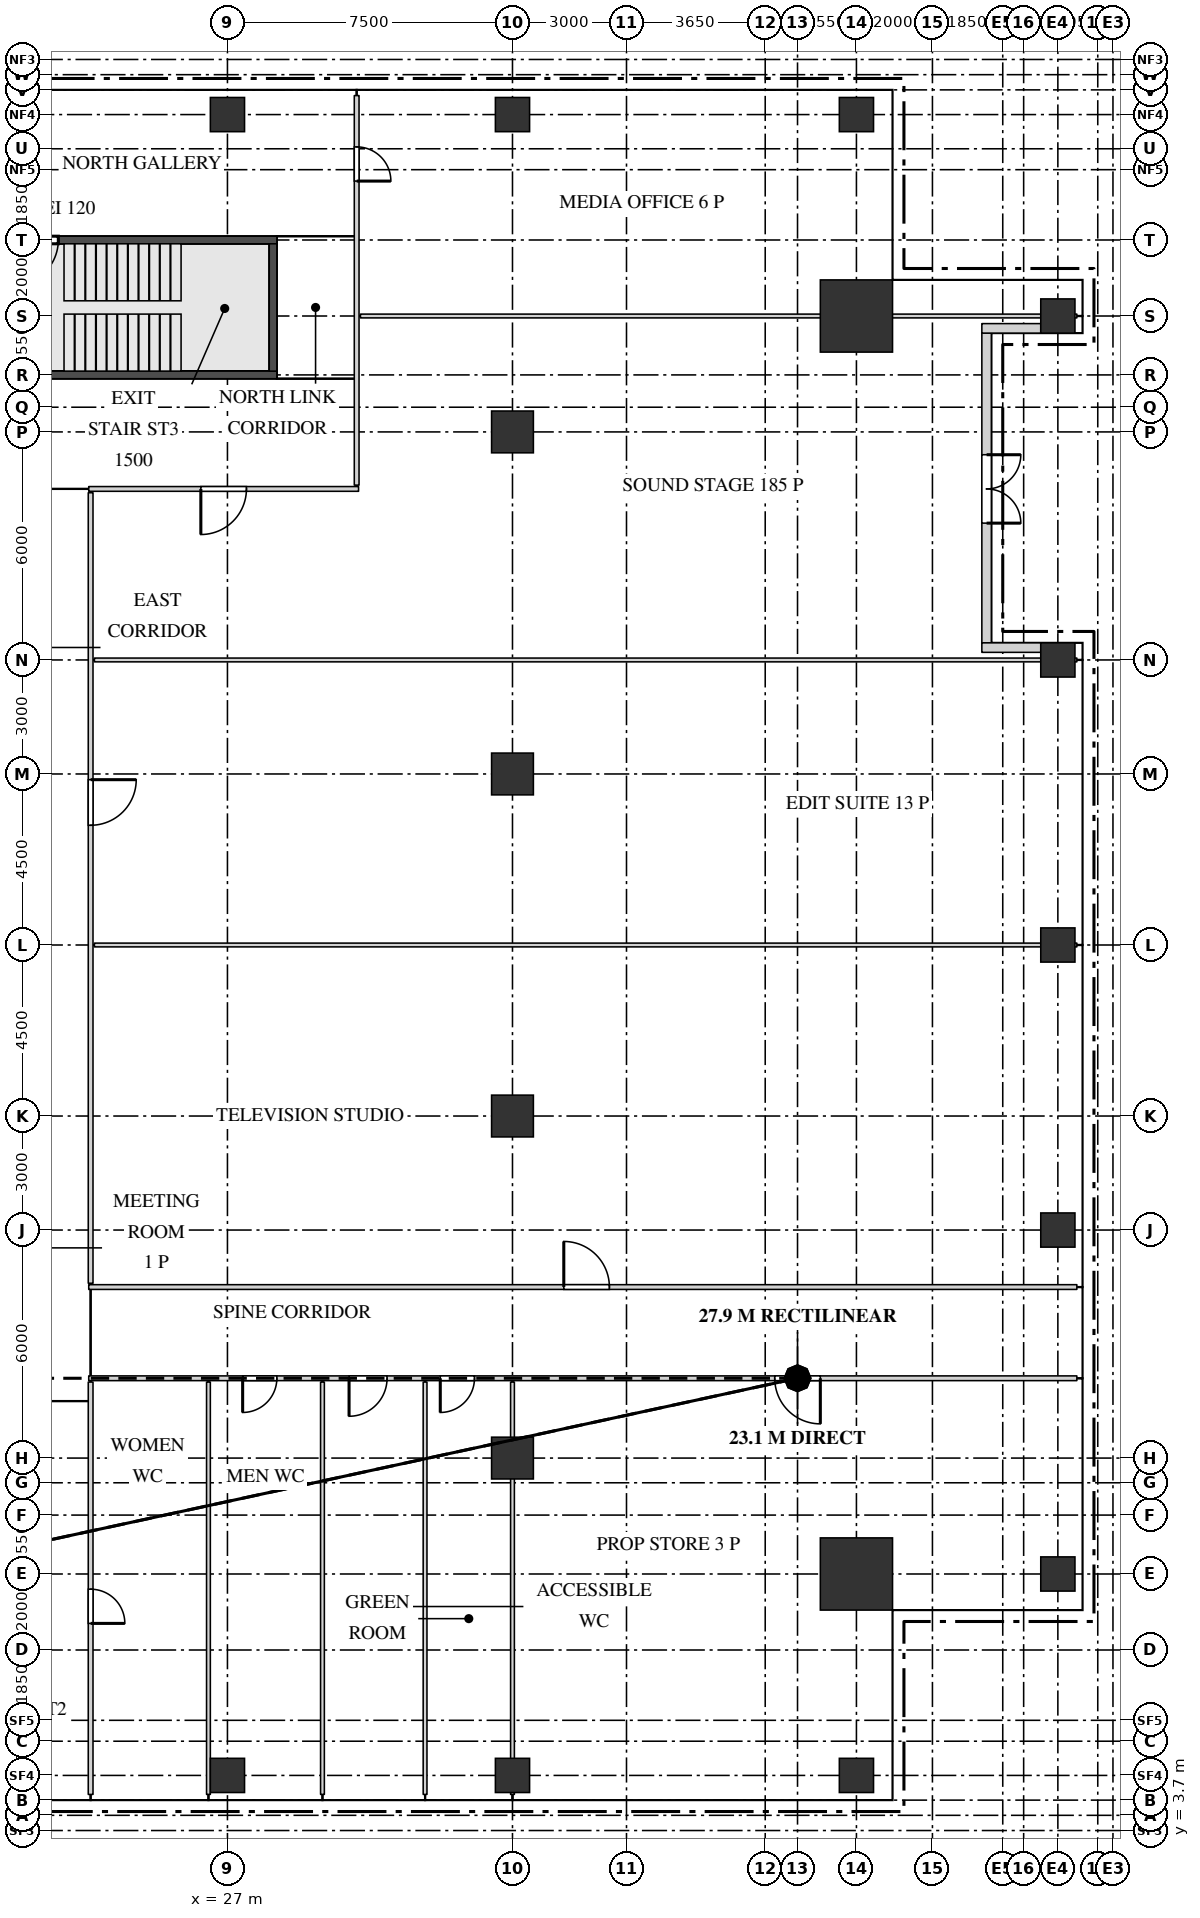
"""IFC4 building model, lengths in metres.
Left out: names, types, materials, properties, quantities, classifications, styles, units other than length and angle.
Written with IfcOpenShell. Run it as: python <this file> out.ifc"""

import sys

from ifc_helpers import new_model, si_unit, direction, frame, frame_2d, origin, origin_2d, place, context, subcontext, project, spatial, rectangle, extrude, source, transform, mapped, element, fill, save


model = new_model("IFC4")
c1 = context("Model", 3, precision=1e-05, world=origin(), true_north=direction((0.0, 1.0)))
c2 = subcontext(c1, "Body", "Model", "MODEL_VIEW")
j1 = project(units=[si_unit("LENGTHUNIT", "METRE"), si_unit("PLANEANGLEUNIT", "RADIAN")], contexts=[c1])
p1 = place(None, origin())
s1 = spatial("IfcSite", under=j1, at=p1, CompositionType="ELEMENT")
p2 = place(p1, origin())
s2 = spatial("IfcBuilding", under=s1, at=p2, CompositionType="ELEMENT")
p3 = place(p2, frame((0.0, 0.0, 246.2)))
s3 = spatial("IfcBuildingStorey", under=s2, at=p3, CompositionType="ELEMENT", Elevation=246.2)
m1 = source(origin(), c2, "Body", "SweptSolid", [
    extrude(rectangle(XDim=7.1, YDim=0.2, at=frame_2d((3.55, 0.0))), origin(), (0.0, 0.0, 1.0), 3.75),
])
p4 = place(p3, frame((21.2, 45.55, 0.0), z_axis=(0.0, 0.0, 1.0), x_axis=(1.0, 0.0, 0.0)))
e1 = element("IfcWall", 1, at=p4, inside=s3, PredefinedType="SHEAR", context=c2, shape_type="MappedRepresentation", body=[
    mapped(m1, transform((0.0, 0.0, 0.0))),
])
m2 = source(origin(), c2, "Body", "SweptSolid", [
    extrude(rectangle(XDim=1.2, YDim=2.1, at=frame_2d((0.6, 1.05))), frame((0.0, 0.11, 0.0), z_axis=(0.0, -1.0, 0.0), x_axis=(1.0, 0.0, 0.0)), (0.0, 0.0, 1.0), 0.22),
])
p5 = place(p4, frame((0.15, 0.0, 0.0)))
e2 = element("IfcOpeningElement", 2, at=p5, cuts=e1, PredefinedType="OPENING", context=c2, shape_type="MappedRepresentation", body=[
    mapped(m2, transform((0.0, 0.0, 0.0))),
])
p6 = place(p3, frame((21.2, 42.0, 0.0), z_axis=(0.0, 0.0, 1.0), x_axis=(1.0, 0.0, 0.0)))
e3 = element("IfcWall", 3, at=p6, inside=s3, PredefinedType="SHEAR", context=c2, shape_type="MappedRepresentation", body=[
    mapped(m1, transform((0.0, 0.0, 0.0))),
])
m3 = source(origin(), c2, "Body", "SweptSolid", [
    extrude(rectangle(XDim=3.35, YDim=0.2, at=frame_2d((1.675, 0.0))), origin(), (0.0, 0.0, 1.0), 3.75),
])
p7 = place(p3, frame((28.2, 42.1, 0.0), z_axis=(0.0, 0.0, 1.0), x_axis=(0.0, 1.0, 0.0)))
e4 = element("IfcWall", 4, at=p7, inside=s3, PredefinedType="SHEAR", context=c2, shape_type="MappedRepresentation", body=[
    mapped(m3, transform((0.0, 0.0, 0.0))),
])
m4 = source(origin(), c2, "Body", "SweptSolid", [
    extrude(rectangle(XDim=1.9, YDim=1.9, at=origin_2d()), origin(), (0.0, 0.0, 1.0), 4.0),
])
for number, where, z_axis, x_axis in (
    (5, (43.55, 43.55, 0.0), (0.0, 0.0, 1.0), (1.0, 0.0, 0.0)),
    (6, (43.55, 10.45, 0.0), (0.0, 0.0, 1.0), (1.0, 0.0, 0.0)),
):
    element("IfcColumn", number, at=place(p3, frame(where, z_axis=z_axis, x_axis=x_axis)), inside=s3, PredefinedType="COLUMN", context=c2, shape_type="MappedRepresentation", body=[
        mapped(m4, transform((0.0, 0.0, 0.0))),
    ])
m5 = source(origin(), c2, "Body", "SweptSolid", [
    extrude(rectangle(XDim=0.9, YDim=0.9, at=origin_2d()), origin(), (0.0, 0.0, 1.0), 3.75),
])
for number, where, z_axis, x_axis in (
    (7, (27.0, 5.15, 0.0), (0.0, 0.0, 1.0), (1.0, 0.0, 0.0)),
    (8, (34.5, 5.15, 0.0), (0.0, 0.0, 1.0), (1.0, 0.0, 0.0)),
    (9, (43.55, 5.15, 0.0), (0.0, 0.0, 1.0), (1.0, 0.0, 0.0)),
    (10, (48.85, 10.45, 0.0), (0.0, 0.0, 1.0), (1.0, 0.0, 0.0)),
    (11, (48.85, 19.5, 0.0), (0.0, 0.0, 1.0), (1.0, 0.0, 0.0)),
    (12, (48.85, 27.0, 0.0), (0.0, 0.0, 1.0), (1.0, 0.0, 0.0)),
    (13, (48.85, 34.5, 0.0), (0.0, 0.0, 1.0), (1.0, 0.0, 0.0)),
    (14, (48.85, 43.55, 0.0), (0.0, 0.0, 1.0), (1.0, 0.0, 0.0)),
    (15, (27.0, 48.85, 0.0), (0.0, 0.0, 1.0), (1.0, 0.0, 0.0)),
    (16, (34.5, 48.85, 0.0), (0.0, 0.0, 1.0), (1.0, 0.0, 0.0)),
    (17, (43.55, 48.85, 0.0), (0.0, 0.0, 1.0), (1.0, 0.0, 0.0)),
):
    element("IfcColumn", number, at=place(p3, frame(where, z_axis=z_axis, x_axis=x_axis)), inside=s3, PredefinedType="COLUMN", context=c2, shape_type="MappedRepresentation", body=[
        mapped(m5, transform((0.0, 0.0, 0.0))),
    ])
m6 = source(origin(), c2, "Body", "SweptSolid", [
    extrude(rectangle(XDim=1.1, YDim=1.1, at=origin_2d()), origin(), (0.0, 0.0, 1.0), 3.75),
])
for number, where, z_axis, x_axis in (
    (18, (34.5, 13.5, 0.0), (0.0, 0.0, 1.0), (1.0, 0.0, 0.0)),
    (19, (34.5, 22.5, 0.0), (0.0, 0.0, 1.0), (1.0, 0.0, 0.0)),
    (20, (34.5, 31.5, 0.0), (0.0, 0.0, 1.0), (1.0, 0.0, 0.0)),
    (21, (34.5, 40.5, 0.0), (0.0, 0.0, 1.0), (1.0, 0.0, 0.0)),
):
    element("IfcColumn", number, at=place(p3, frame(where, z_axis=z_axis, x_axis=x_axis)), inside=s3, PredefinedType="COLUMN", context=c2, shape_type="MappedRepresentation", body=[
        mapped(m6, transform((0.0, 0.0, 0.0))),
    ])
m7 = source(origin(), c2, "Body", "SweptSolid", [
    extrude(rectangle(XDim=8.15, YDim=0.25, at=frame_2d((4.075, 0.0))), origin(), (0.0, 0.0, 1.0), 3.2),
])
p8 = place(p3, frame((46.975, 34.95, 0.0), z_axis=(0.0, 0.0, 1.0), x_axis=(0.0, 1.0, 0.0)))
e22 = element("IfcWall", 22, at=p8, inside=s3, PredefinedType="SOLIDWALL", context=c2, shape_type="MappedRepresentation", body=[
    mapped(m7, transform((0.0, 0.0, 0.0))),
])
m8 = source(origin(), c2, "Body", "SweptSolid", [
    extrude(rectangle(XDim=2.5, YDim=2.4, at=frame_2d((1.25, 1.2))), frame((0.0, 0.135, 0.0), z_axis=(0.0, -1.0, 0.0), x_axis=(1.0, 0.0, 0.0)), (0.0, 0.0, 1.0), 0.27),
])
p9 = place(p8, frame((0.35, 0.0, 0.0)))
e23 = element("IfcOpeningElement", 23, at=p9, cuts=e22, PredefinedType="OPENING", context=c2, shape_type="MappedRepresentation", body=[
    mapped(m8, transform((0.0, 0.0, 0.0))),
])
p10 = place(p8, frame((5.25, 0.0, 0.0)))
e24 = element("IfcOpeningElement", 24, at=p10, cuts=e22, PredefinedType="OPENING", context=c2, shape_type="MappedRepresentation", body=[
    mapped(m8, transform((0.0, 0.0, 0.0))),
])
m9 = source(origin(), c2, "Body", "SweptSolid", [
    extrude(rectangle(XDim=1.8, YDim=2.4, at=frame_2d((0.9, 1.2))), frame((0.0, 0.135, 0.0), z_axis=(0.0, -1.0, 0.0), x_axis=(1.0, 0.0, 0.0)), (0.0, 0.0, 1.0), 0.27),
])
p11 = place(p8, frame((3.15, 0.0, 0.0)))
e25 = element("IfcOpeningElement", 25, at=p11, cuts=e22, PredefinedType="OPENING", context=c2, shape_type="MappedRepresentation", body=[
    mapped(m9, transform((0.0, 0.0, 0.0))),
])
m10 = source(origin(), c2, "Body", "SweptSolid", [
    extrude(rectangle(XDim=1.55, YDim=0.25, at=frame_2d((0.775, 0.0))), origin(), (0.0, 0.0, 1.0), 3.2),
])
for number, where, z_axis, x_axis in (
    (26, (48.4, 34.825, 0.0), (0.0, 0.0, 1.0), (-1.0, 0.0, 0.0)),
    (27, (48.4, 43.225, 0.0), (0.0, 0.0, 1.0), (-1.0, 0.0, 0.0)),
):
    element("IfcWall", number, at=place(p3, frame(where, z_axis=z_axis, x_axis=x_axis)), inside=s3, PredefinedType="SOLIDWALL", context=c2, shape_type="MappedRepresentation", body=[
        mapped(m10, transform((0.0, 0.0, 0.0))),
    ])
m11 = source(origin(), c2, "Body", "SweptSolid", [
    extrude(rectangle(XDim=10.85, YDim=0.125, at=frame_2d((5.425, 0.0))), origin(), (0.0, 0.0, 1.0), 3.8),
])
p12 = place(p3, frame((23.4, 4.65, 0.0), z_axis=(0.0, 0.0, 1.0), x_axis=(0.0, 1.0, 0.0)))
e28 = element("IfcWall", 28, at=p12, inside=s3, PredefinedType="PARTITIONING", context=c2, shape_type="MappedRepresentation", body=[
    mapped(m11, transform((0.0, 0.0, 0.0))),
])
m12 = source(origin(), c2, "Body", "SweptSolid", [
    extrude(rectangle(XDim=0.9, YDim=2.1, at=frame_2d((0.45, 1.05))), frame((0.0, 0.073, 0.0), z_axis=(0.0, -1.0, 0.0), x_axis=(1.0, 0.0, 0.0)), (0.0, 0.0, 1.0), 0.145),
])
p13 = place(p12, frame((4.5, 0.0, 0.0)))
e29 = element("IfcOpeningElement", 29, at=p13, cuts=e28, PredefinedType="OPENING", context=c2, shape_type="MappedRepresentation", body=[
    mapped(m12, transform((0.0, 0.0, 0.0))),
])
m13 = source(origin(), c2, "Body", "SweptSolid", [
    extrude(rectangle(XDim=10.85, YDim=0.1, at=frame_2d((5.425, 0.0))), origin(), (0.0, 0.0, 1.0), 3.8),
])
for number, where, z_axis, x_axis in (
    (30, (26.5, 4.65, 0.0), (0.0, 0.0, 1.0), (0.0, 1.0, 0.0)),
    (31, (29.5, 4.65, 0.0), (0.0, 0.0, 1.0), (0.0, 1.0, 0.0)),
    (32, (32.2, 4.65, 0.0), (0.0, 0.0, 1.0), (0.0, 1.0, 0.0)),
):
    element("IfcWall", number, at=place(p3, frame(where, z_axis=z_axis, x_axis=x_axis)), inside=s3, PredefinedType="PARTITIONING", context=c2, shape_type="MappedRepresentation", body=[
        mapped(m13, transform((0.0, 0.0, 0.0))),
    ])
m14 = source(origin(), c2, "Body", "SweptSolid", [
    extrude(rectangle(XDim=10.85, YDim=0.1, at=frame_2d((5.425, 0.0))), origin(), (0.0, 0.0, 1.0), 3.35),
])
p14 = place(p3, frame((34.5, 4.65, 0.0), z_axis=(0.0, 0.0, 1.0), x_axis=(0.0, 1.0, 0.0)))
e33 = element("IfcWall", 33, at=p14, inside=s3, PredefinedType="PARTITIONING", context=c2, shape_type="MappedRepresentation", body=[
    mapped(m14, transform((0.0, 0.0, 0.0))),
])
m15 = source(origin(), c2, "Body", "SweptSolid", [
    extrude(rectangle(XDim=26.0, YDim=0.125, at=frame_2d((13.0, 0.0))), origin(), (0.0, 0.0, 1.0), 3.8),
])
p15 = place(p3, frame((23.35, 15.6, 0.0), z_axis=(0.0, 0.0, 1.0), x_axis=(1.0, 0.0, 0.0)))
e34 = element("IfcWall", 34, at=p15, inside=s3, PredefinedType="PARTITIONING", context=c2, shape_type="MappedRepresentation", body=[
    mapped(m15, transform((0.0, 0.0, 0.0))),
])
p16 = place(p15, frame((4.05, 0.0, 0.0)))
e35 = element("IfcOpeningElement", 35, at=p16, cuts=e34, PredefinedType="OPENING", context=c2, shape_type="MappedRepresentation", body=[
    mapped(m12, transform((0.0, 0.0, 0.0))),
])
m16 = source(origin(), c2, "Body", "SweptSolid", [
    extrude(rectangle(XDim=1.0, YDim=2.1, at=frame_2d((0.5, 1.05))), frame((0.0, 0.073, 0.0), z_axis=(0.0, -1.0, 0.0), x_axis=(1.0, 0.0, 0.0)), (0.0, 0.0, 1.0), 0.145),
])
p17 = place(p15, frame((6.85, 0.0, 0.0)))
e36 = element("IfcOpeningElement", 36, at=p17, cuts=e34, PredefinedType="OPENING", context=c2, shape_type="MappedRepresentation", body=[
    mapped(m16, transform((0.0, 0.0, 0.0))),
])
p18 = place(p15, frame((9.25, 0.0, 0.0)))
e37 = element("IfcOpeningElement", 37, at=p18, cuts=e34, PredefinedType="OPENING", context=c2, shape_type="MappedRepresentation", body=[
    mapped(m12, transform((0.0, 0.0, 0.0))),
])
m17 = source(origin(), c2, "Body", "SweptSolid", [
    extrude(rectangle(XDim=1.2, YDim=2.1, at=frame_2d((0.6, 1.05))), frame((0.0, 0.073, 0.0), z_axis=(0.0, -1.0, 0.0), x_axis=(1.0, 0.0, 0.0)), (0.0, 0.0, 1.0), 0.145),
])
p19 = place(p15, frame((18.05, 0.0, 0.0)))
e38 = element("IfcOpeningElement", 38, at=p19, cuts=e34, PredefinedType="OPENING", context=c2, shape_type="MappedRepresentation", body=[
    mapped(m17, transform((0.0, 0.0, 0.0))),
])
p20 = place(p3, frame((23.35, 18.0, 0.0), z_axis=(0.0, 0.0, 1.0), x_axis=(1.0, 0.0, 0.0)))
e39 = element("IfcWall", 39, at=p20, inside=s3, PredefinedType="PARTITIONING", context=c2, shape_type="MappedRepresentation", body=[
    mapped(m15, transform((0.0, 0.0, 0.0))),
])
p21 = place(p20, frame((12.5, 0.0, 0.0)))
e40 = element("IfcOpeningElement", 40, at=p21, cuts=e39, PredefinedType="OPENING", context=c2, shape_type="MappedRepresentation", body=[
    mapped(m17, transform((0.0, 0.0, 0.0))),
])
m18 = source(origin(), c2, "Body", "SweptSolid", [
    extrude(rectangle(XDim=20.8, YDim=0.125, at=frame_2d((10.4, 0.0))), origin(), (0.0, 0.0, 1.0), 3.8),
])
p22 = place(p3, frame((23.4, 18.1, 0.0), z_axis=(0.0, 0.0, 1.0), x_axis=(0.0, 1.0, 0.0)))
e41 = element("IfcWall", 41, at=p22, inside=s3, PredefinedType="PARTITIONING", context=c2, shape_type="MappedRepresentation", body=[
    mapped(m18, transform((0.0, 0.0, 0.0))),
])
p23 = place(p22, frame((12.05, 0.0, 0.0)))
e42 = element("IfcOpeningElement", 42, at=p23, cuts=e41, PredefinedType="OPENING", context=c2, shape_type="MappedRepresentation", body=[
    mapped(m17, transform((0.0, 0.0, 0.0))),
])
m19 = source(origin(), c2, "Body", "SweptSolid", [
    extrude(rectangle(XDim=25.85, YDim=0.1, at=frame_2d((12.925, 0.0))), origin(), (0.0, 0.0, 1.0), 3.8),
])
for number, where, z_axis, x_axis in (
    (43, (23.5, 27.0, 0.0), (0.0, 0.0, 1.0), (1.0, 0.0, 0.0)),
    (44, (23.5, 34.5, 0.0), (0.0, 0.0, 1.0), (1.0, 0.0, 0.0)),
):
    element("IfcWall", number, at=place(p3, frame(where, z_axis=z_axis, x_axis=x_axis)), inside=s3, PredefinedType="PARTITIONING", context=c2, shape_type="MappedRepresentation", body=[
        mapped(m19, transform((0.0, 0.0, 0.0))),
    ])
m20 = source(origin(), c2, "Body", "SweptSolid", [
    extrude(rectangle(XDim=7.1, YDim=0.125, at=frame_2d((3.55, 0.0))), origin(), (0.0, 0.0, 1.0), 3.8),
])
p24 = place(p3, frame((23.35, 39.0, 0.0), z_axis=(0.0, 0.0, 1.0), x_axis=(1.0, 0.0, 0.0)))
e45 = element("IfcWall", 45, at=p24, inside=s3, PredefinedType="PARTITIONING", context=c2, shape_type="MappedRepresentation", body=[
    mapped(m20, transform((0.0, 0.0, 0.0))),
])
p25 = place(p24, frame((2.95, 0.0, 0.0)))
e46 = element("IfcOpeningElement", 46, at=p25, cuts=e45, PredefinedType="OPENING", context=c2, shape_type="MappedRepresentation", body=[
    mapped(m17, transform((0.0, 0.0, 0.0))),
])
m21 = source(origin(), c2, "Body", "SweptSolid", [
    extrude(rectangle(XDim=10.25, YDim=0.125, at=frame_2d((5.125, 0.0))), origin(), (0.0, 0.0, 1.0), 3.8),
])
p26 = place(p3, frame((30.4, 39.1, 0.0), z_axis=(0.0, 0.0, 1.0), x_axis=(0.0, 1.0, 0.0)))
e47 = element("IfcWall", 47, at=p26, inside=s3, PredefinedType="PARTITIONING", context=c2, shape_type="MappedRepresentation", body=[
    mapped(m21, transform((0.0, 0.0, 0.0))),
])
p27 = place(p26, frame((8.0, 0.0, 0.0)))
e48 = element("IfcOpeningElement", 48, at=p27, cuts=e47, PredefinedType="OPENING", context=c2, shape_type="MappedRepresentation", body=[
    mapped(m12, transform((0.0, 0.0, 0.0))),
])
m22 = source(origin(), c2, "Body", "SweptSolid", [
    extrude(rectangle(XDim=18.85, YDim=0.1, at=frame_2d((9.425, 0.0))), origin(), (0.0, 0.0, 1.0), 3.3),
])
p28 = place(p3, frame((30.5, 43.55, 0.0), z_axis=(0.0, 0.0, 1.0), x_axis=(1.0, 0.0, 0.0)))
e49 = element("IfcWall", 49, at=p28, inside=s3, PredefinedType="PARTITIONING", context=c2, shape_type="MappedRepresentation", body=[
    mapped(m22, transform((0.0, 0.0, 0.0))),
])
m23 = source(origin(), c2, "Body", "SweptSolid", [
    extrude(rectangle(XDim=2.5, YDim=2.4, at=frame_2d((1.25, 1.2))), frame((0.0, 0.03, 0.0), z_axis=(0.0, -1.0, 0.0), x_axis=(1.0, 0.0, 0.0)), (0.0, 0.0, 1.0), 0.06),
])
p29 = place(p9, origin())
e50 = element("IfcWindow", 50, at=p29, inside=s3, PartitioningType="SINGLE_PANEL", PredefinedType="WINDOW", context=c2, shape_type="MappedRepresentation", body=[
    mapped(m23, transform((0.0, 0.0, 0.0))),
])
fill(e23, e50)
p30 = place(p10, origin())
e51 = element("IfcWindow", 51, at=p30, inside=s3, PartitioningType="SINGLE_PANEL", PredefinedType="WINDOW", context=c2, shape_type="MappedRepresentation", body=[
    mapped(m23, transform((0.0, 0.0, 0.0))),
])
fill(e24, e51)
m24 = source(origin(), c2, "Body", "SweptSolid", [
    extrude(rectangle(XDim=1.8, YDim=2.4, at=frame_2d((0.9, 1.2))), frame((0.0, 0.025, 0.0), z_axis=(0.0, -1.0, 0.0), x_axis=(1.0, 0.0, 0.0)), (0.0, 0.0, 1.0), 0.05),
])
p31 = place(p11, origin())
e52 = element("IfcDoor", 52, at=p31, inside=s3, OperationType="DOUBLE_DOOR_DOUBLE_SWING", PredefinedType="DOOR", context=c2, shape_type="MappedRepresentation", body=[
    mapped(m24, transform((0.0, 0.0, 0.0))),
])
fill(e25, e52)
m25 = source(origin(), c2, "Body", "SweptSolid", [
    extrude(rectangle(XDim=0.9, YDim=2.1, at=frame_2d((0.45, 1.05))), frame((0.0, 0.025, 0.0), z_axis=(0.0, -1.0, 0.0), x_axis=(1.0, 0.0, 0.0)), (0.0, 0.0, 1.0), 0.05),
])
p32 = place(p13, origin())
e53 = element("IfcDoor", 53, at=p32, inside=s3, OperationType="SINGLE_SWING_LEFT", PredefinedType="DOOR", context=c2, shape_type="MappedRepresentation", body=[
    mapped(m25, transform((0.0, 0.0, 0.0))),
])
fill(e29, e53)
p33 = place(p16, origin())
e54 = element("IfcDoor", 54, at=p33, inside=s3, OperationType="SINGLE_SWING_LEFT", PredefinedType="DOOR", context=c2, shape_type="MappedRepresentation", body=[
    mapped(m25, transform((0.0, 0.0, 0.0))),
])
fill(e35, e54)
m26 = source(origin(), c2, "Body", "SweptSolid", [
    extrude(rectangle(XDim=1.0, YDim=2.1, at=frame_2d((0.5, 1.05))), frame((0.0, 0.025, 0.0), z_axis=(0.0, -1.0, 0.0), x_axis=(1.0, 0.0, 0.0)), (0.0, 0.0, 1.0), 0.05),
])
p34 = place(p17, origin())
e55 = element("IfcDoor", 55, at=p34, inside=s3, OperationType="SINGLE_SWING_LEFT", PredefinedType="DOOR", context=c2, shape_type="MappedRepresentation", body=[
    mapped(m26, transform((0.0, 0.0, 0.0))),
])
fill(e36, e55)
p35 = place(p18, origin())
e56 = element("IfcDoor", 56, at=p35, inside=s3, OperationType="SINGLE_SWING_LEFT", PredefinedType="DOOR", context=c2, shape_type="MappedRepresentation", body=[
    mapped(m25, transform((0.0, 0.0, 0.0))),
])
fill(e37, e56)
m27 = source(origin(), c2, "Body", "SweptSolid", [
    extrude(rectangle(XDim=1.2, YDim=2.1, at=frame_2d((0.6, 1.05))), frame((0.0, 0.025, 0.0), z_axis=(0.0, -1.0, 0.0), x_axis=(1.0, 0.0, 0.0)), (0.0, 0.0, 1.0), 0.05),
])
p36 = place(p19, origin())
e57 = element("IfcDoor", 57, at=p36, inside=s3, OperationType="SINGLE_SWING_RIGHT", PredefinedType="DOOR", context=c2, shape_type="MappedRepresentation", body=[
    mapped(m27, transform((0.0, 0.0, 0.0))),
])
fill(e38, e57)
p37 = place(p21, origin())
e58 = element("IfcDoor", 58, at=p37, inside=s3, OperationType="SINGLE_SWING_RIGHT", PredefinedType="DOOR", context=c2, shape_type="MappedRepresentation", body=[
    mapped(m27, transform((0.0, 0.0, 0.0))),
])
fill(e40, e58)
p38 = place(p23, origin())
e59 = element("IfcDoor", 59, at=p38, inside=s3, OperationType="SINGLE_SWING_RIGHT", PredefinedType="DOOR", context=c2, shape_type="MappedRepresentation", body=[
    mapped(m27, transform((0.0, 0.0, 0.0))),
])
fill(e42, e59)
p39 = place(p25, origin())
e60 = element("IfcDoor", 60, at=p39, inside=s3, OperationType="SINGLE_SWING_LEFT", PredefinedType="DOOR", context=c2, shape_type="MappedRepresentation", body=[
    mapped(m27, transform((0.0, 0.0, 0.0))),
])
fill(e46, e60)
p40 = place(p27, origin())
e61 = element("IfcDoor", 61, at=p40, inside=s3, OperationType="SINGLE_SWING_LEFT", PredefinedType="DOOR", context=c2, shape_type="MappedRepresentation", body=[
    mapped(m25, transform((0.0, 0.0, 0.0))),
])
fill(e48, e61)
p41 = place(p5, origin())
e62 = element("IfcDoor", 62, at=p41, inside=s3, OperationType="SINGLE_SWING_LEFT", PredefinedType="DOOR", context=c2, shape_type="MappedRepresentation", body=[
    mapped(m27, transform((0.0, 0.0, 0.0))),
])
fill(e2, e62)
save(model, sys.argv[1])
